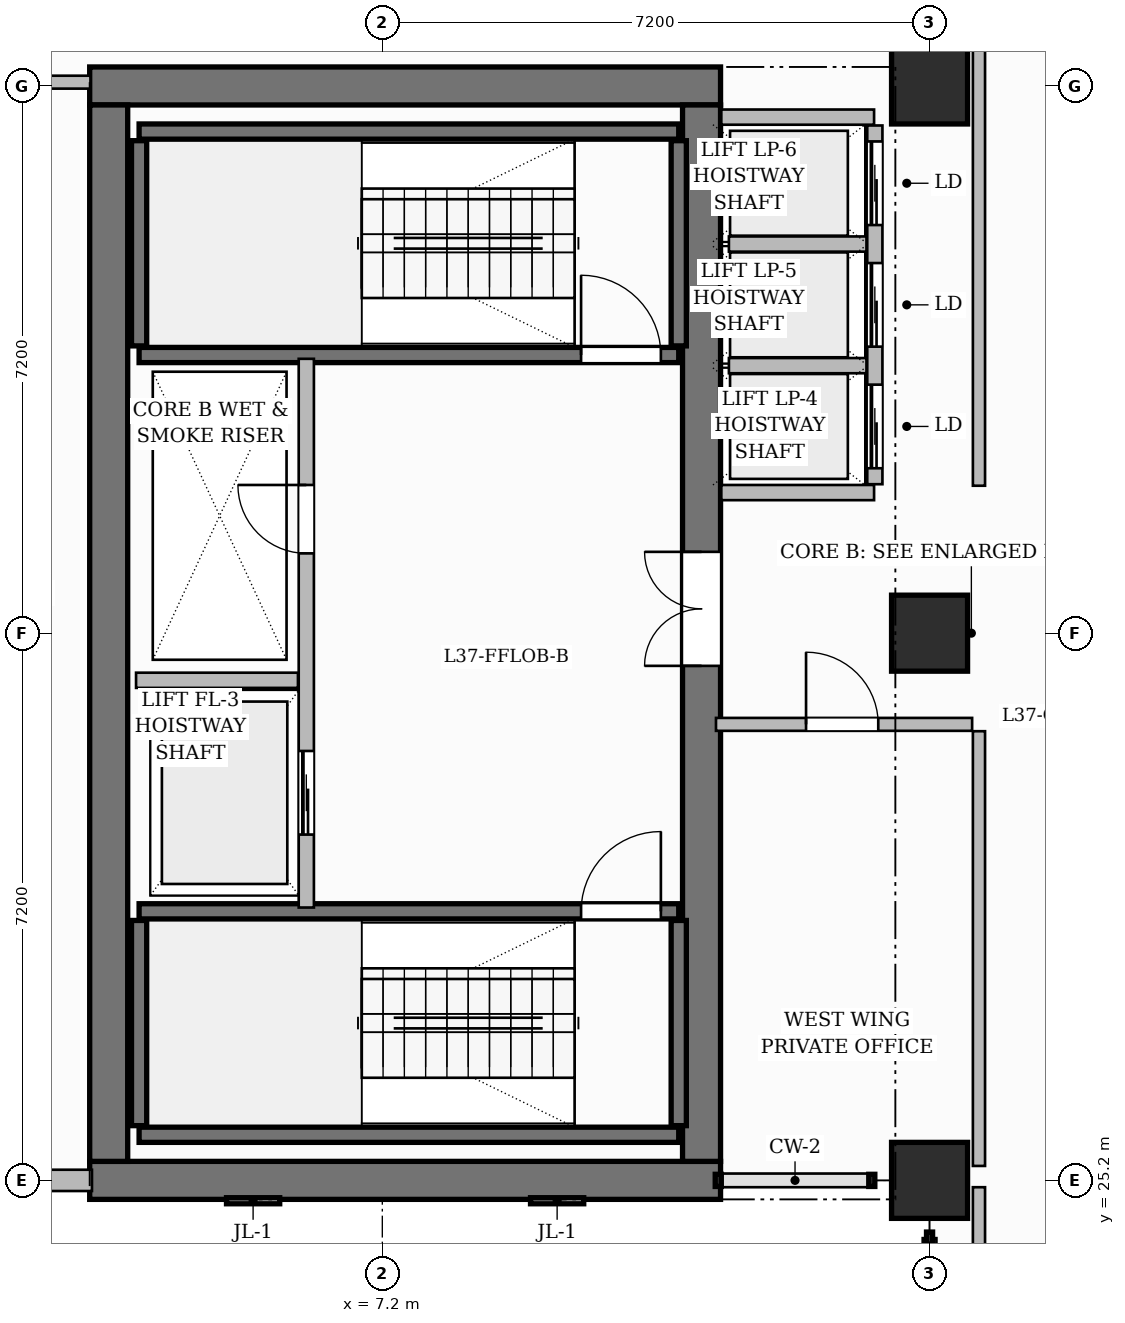
"""IFC4 building model, lengths in metres.
Left out: names, types, materials, properties, quantities, classifications, styles, units other than length and angle.
Written with IfcOpenShell. Run it as: python <this file> out.ifc"""

import sys

from ifc_helpers import new_model, si_unit, direction, frame, frame_2d, origin, origin_2d, place, context, subcontext, project, spatial, rectangle, extrude, source, transform, mapped, element, fill, save


model = new_model("IFC4")
c1 = context("Model", 3, precision=1e-05, world=origin(), true_north=direction((0.0, 1.0)))
c2 = subcontext(c1, "Body", "Model", "MODEL_VIEW")
j1 = project(units=[si_unit("LENGTHUNIT", "METRE"), si_unit("PLANEANGLEUNIT", "RADIAN")], contexts=[c1])
p1 = place(None, origin())
s1 = spatial("IfcSite", under=j1, at=p1, CompositionType="ELEMENT")
p2 = place(p1, origin())
s2 = spatial("IfcBuilding", under=s1, at=p2, CompositionType="ELEMENT")
p3 = place(p2, frame((0.0, 0.0, 150.3)))
s3 = spatial("IfcBuildingStorey", under=s2, at=p3, CompositionType="ELEMENT", Elevation=150.3)
for number, where, z_axis, x_axis in (
    (1, (3.35, 25.2, 0.0), (0.0, 0.0, 1.0), (1.0, 0.0, 0.0)),
    (2, (3.35, 39.6, 0.0), (0.0, 0.0, 1.0), (1.0, 0.0, 0.0)),
):
    element("IfcWall", number, at=place(p3, frame(where, z_axis=z_axis, x_axis=x_axis)), inside=s3, PredefinedType="SHEAR", context=c2, shape_type="SweptSolid", body=[
        extrude(rectangle(XDim=8.3, YDim=0.5, at=frame_2d((4.15, 0.0))), origin(), (0.0, 0.0, 1.0), 3.85),
    ])
p4 = place(p3, frame((3.6, 25.45, 0.0), z_axis=(0.0, 0.0, 1.0), x_axis=(0.0, 1.0, 0.0)))
e3 = element("IfcWall", 3, at=p4, inside=s3, PredefinedType="SHEAR", context=c2, shape_type="SweptSolid", body=[
    extrude(rectangle(XDim=13.9, YDim=0.5, at=frame_2d((6.95, 0.0))), origin(), (0.0, 0.0, 1.0), 3.85),
])
p5 = place(p3, frame((11.4, 25.45, 0.0), z_axis=(0.0, 0.0, 1.0), x_axis=(0.0, 1.0, 0.0)))
e4 = element("IfcWall", 4, at=p5, inside=s3, PredefinedType="SHEAR", context=c2, shape_type="SweptSolid", body=[
    extrude(rectangle(XDim=13.9, YDim=0.5, at=frame_2d((6.95, 0.0))), origin(), (0.0, 0.0, 1.0), 3.85),
])
p6 = place(p5, frame((6.52, 0.0, 0.0)))
e5 = element("IfcOpeningElement", 5, at=p6, cuts=e4, PredefinedType="OPENING", context=c2, shape_type="SweptSolid", body=[
    extrude(rectangle(XDim=1.5, YDim=2.2, at=frame_2d((0.75, 1.1))), frame((0.0, 0.26, 0.0), z_axis=(0.0, -1.0, 0.0), x_axis=(1.0, 0.0, 0.0)), (0.0, 0.0, 1.0), 0.52),
])
m1 = source(origin(), c2, "Body", "SweptSolid", [
    extrude(rectangle(XDim=1.0, YDim=1.0, at=origin_2d()), origin(), (0.0, 0.0, 1.0), 3.85),
])
for number, where, z_axis, x_axis in (
    (6, (14.4, 25.2, 0.0), (0.0, 0.0, 1.0), (1.0, 0.0, 0.0)),
    (7, (14.4, 32.4, 0.0), (0.0, 0.0, 1.0), (1.0, 0.0, 0.0)),
    (8, (14.4, 39.6, 0.0), (0.0, 0.0, 1.0), (1.0, 0.0, 0.0)),
):
    element("IfcColumn", number, at=place(p3, frame(where, z_axis=z_axis, x_axis=x_axis)), inside=s3, PredefinedType="COLUMN", context=c2, shape_type="MappedRepresentation", body=[
        mapped(m1, transform((0.0, 0.0, 0.0), scale=1.0)),
    ])
p7 = place(p3, frame((4.0, 25.8, 0.0), z_axis=(0.0, 0.0, 1.0), x_axis=(1.0, 0.0, 0.0)))
e9 = element("IfcWall", 9, at=p7, inside=s3, PredefinedType="SHEAR", context=c2, shape_type="SweptSolid", body=[
    extrude(rectangle(XDim=7.1, YDim=0.2, at=frame_2d((3.55, 0.0))), origin(), (0.0, 0.0, 1.0), 3.85),
])
for number, where, z_axis, x_axis in (
    (10, (4.0, 25.92, 0.0), (0.0, 0.0, 1.0), (0.0, 1.0, 0.0)),
    (11, (11.1, 25.92, 0.0), (0.0, 0.0, 1.0), (0.0, 1.0, 0.0)),
):
    element("IfcWall", number, at=place(p3, frame(where, z_axis=z_axis, x_axis=x_axis)), inside=s3, PredefinedType="SHEAR", context=c2, shape_type="SweptSolid", body=[
        extrude(rectangle(XDim=2.7, YDim=0.2, at=frame_2d((1.35, 0.0))), origin(), (0.0, 0.0, 1.0), 3.85),
    ])
p8 = place(p3, frame((4.0, 28.74, 0.0), z_axis=(0.0, 0.0, 1.0), x_axis=(1.0, 0.0, 0.0)))
e12 = element("IfcWall", 12, at=p8, inside=s3, PredefinedType="SHEAR", context=c2, shape_type="SweptSolid", body=[
    extrude(rectangle(XDim=7.1, YDim=0.2, at=frame_2d((3.55, 0.0))), origin(), (0.0, 0.0, 1.0), 3.85),
])
p9 = place(p8, frame((5.815, 0.0, 0.0)))
e13 = element("IfcOpeningElement", 13, at=p9, cuts=e12, PredefinedType="OPENING", context=c2, shape_type="SweptSolid", body=[
    extrude(rectangle(XDim=1.05, YDim=2.2, at=frame_2d((0.525, 1.1))), frame((0.0, 0.11, 0.0), z_axis=(0.0, -1.0, 0.0), x_axis=(1.0, 0.0, 0.0)), (0.0, 0.0, 1.0), 0.22),
])
p10 = place(p3, frame((4.0, 39.0, 0.0), z_axis=(0.0, 0.0, 1.0), x_axis=(1.0, 0.0, 0.0)))
e14 = element("IfcWall", 14, at=p10, inside=s3, PredefinedType="SHEAR", context=c2, shape_type="SweptSolid", body=[
    extrude(rectangle(XDim=7.1, YDim=0.2, at=frame_2d((3.55, 0.0))), origin(), (0.0, 0.0, 1.0), 3.85),
])
for number, where, z_axis, x_axis in (
    (15, (4.0, 36.18, 0.0), (0.0, 0.0, 1.0), (0.0, 1.0, 0.0)),
    (16, (11.1, 36.18, 0.0), (0.0, 0.0, 1.0), (0.0, 1.0, 0.0)),
):
    element("IfcWall", number, at=place(p3, frame(where, z_axis=z_axis, x_axis=x_axis)), inside=s3, PredefinedType="SHEAR", context=c2, shape_type="SweptSolid", body=[
        extrude(rectangle(XDim=2.7, YDim=0.2, at=frame_2d((1.35, 0.0))), origin(), (0.0, 0.0, 1.0), 3.85),
    ])
p11 = place(p3, frame((4.0, 36.06, 0.0), z_axis=(0.0, 0.0, 1.0), x_axis=(1.0, 0.0, 0.0)))
e17 = element("IfcWall", 17, at=p11, inside=s3, PredefinedType="SHEAR", context=c2, shape_type="SweptSolid", body=[
    extrude(rectangle(XDim=7.1, YDim=0.2, at=frame_2d((3.55, 0.0))), origin(), (0.0, 0.0, 1.0), 3.85),
])
p12 = place(p11, frame((5.815, 0.0, 0.0)))
e18 = element("IfcOpeningElement", 18, at=p12, cuts=e17, PredefinedType="OPENING", context=c2, shape_type="SweptSolid", body=[
    extrude(rectangle(XDim=1.05, YDim=2.2, at=frame_2d((0.525, 1.1))), frame((0.0, 0.11, 0.0), z_axis=(0.0, -1.0, 0.0), x_axis=(1.0, 0.0, 0.0)), (0.0, 0.0, 1.0), 0.22),
])
p13 = place(p3, frame((6.2, 28.79, 0.0), z_axis=(0.0, 0.0, 1.0), x_axis=(0.0, 1.0, 0.0)))
e19 = element("IfcWall", 19, at=p13, inside=s3, PredefinedType="PARTITIONING", context=c2, shape_type="SweptSolid", body=[
    extrude(rectangle(XDim=7.22, YDim=0.2, at=frame_2d((3.61, 0.0))), origin(), (0.0, 0.0, 1.0), 3.6),
])
p14 = place(p13, frame((4.66, 0.0, 0.0)))
e20 = element("IfcOpeningElement", 20, at=p14, cuts=e19, PredefinedType="OPENING", context=c2, shape_type="SweptSolid", body=[
    extrude(rectangle(XDim=0.9, YDim=2.1, at=frame_2d((0.45, 1.05))), frame((0.0, 0.11, 0.0), z_axis=(0.0, -1.0, 0.0), x_axis=(1.0, 0.0, 0.0)), (0.0, 0.0, 1.0), 0.22),
])
p15 = place(p13, frame((0.96, 0.0, 0.0)))
e21 = element("IfcOpeningElement", 21, at=p15, cuts=e19, PredefinedType="OPENING", context=c2, shape_type="SweptSolid", body=[
    extrude(rectangle(XDim=1.1, YDim=2.2, at=frame_2d((0.55, 1.1))), frame((0.0, 0.11, 0.0), z_axis=(0.0, -1.0, 0.0), x_axis=(1.0, 0.0, 0.0)), (0.0, 0.0, 1.0), 0.22),
])
p16 = place(p3, frame((3.96, 31.78, 0.0), z_axis=(0.0, 0.0, 1.0), x_axis=(1.0, 0.0, 0.0)))
e22 = element("IfcWall", 22, at=p16, inside=s3, PredefinedType="PARTITIONING", context=c2, shape_type="SweptSolid", body=[
    extrude(rectangle(XDim=2.13, YDim=0.2, at=frame_2d((1.065, 0.0))), origin(), (0.0, 0.0, 1.0), 3.6),
])
for number, where, z_axis, x_axis in (
    (23, (11.66, 34.25, 0.0), (0.0, 0.0, 1.0), (1.0, 0.0, 0.0)),
    (24, (11.66, 39.19, 0.0), (0.0, 0.0, 1.0), (1.0, 0.0, 0.0)),
):
    element("IfcWall", number, at=place(p3, frame(where, z_axis=z_axis, x_axis=x_axis)), inside=s3, PredefinedType="PARTITIONING", context=c2, shape_type="SweptSolid", body=[
        extrude(rectangle(XDim=2.01, YDim=0.2, at=frame_2d((1.005, 0.0))), origin(), (0.0, 0.0, 1.0), 3.6),
    ])
p17 = place(p3, frame((13.68, 34.36, 0.0), z_axis=(0.0, 0.0, 1.0), x_axis=(0.0, 1.0, 0.0)))
e25 = element("IfcWall", 25, at=p17, inside=s3, PredefinedType="PARTITIONING", context=c2, shape_type="SweptSolid", body=[
    extrude(rectangle(XDim=4.72, YDim=0.2, at=frame_2d((2.36, 0.0))), origin(), (0.0, 0.0, 1.0), 3.6),
])
p18 = place(p17, frame((0.21, 0.0, 0.0)))
e26 = element("IfcOpeningElement", 26, at=p18, cuts=e25, PredefinedType="OPENING", context=c2, shape_type="SweptSolid", body=[
    extrude(rectangle(XDim=1.1, YDim=2.2, at=frame_2d((0.55, 1.1))), frame((0.0, 0.11, 0.0), z_axis=(0.0, -1.0, 0.0), x_axis=(1.0, 0.0, 0.0)), (0.0, 0.0, 1.0), 0.22),
])
p19 = place(p17, frame((1.81, 0.0, 0.0)))
e27 = element("IfcOpeningElement", 27, at=p19, cuts=e25, PredefinedType="OPENING", context=c2, shape_type="SweptSolid", body=[
    extrude(rectangle(XDim=1.1, YDim=2.2, at=frame_2d((0.55, 1.1))), frame((0.0, 0.11, 0.0), z_axis=(0.0, -1.0, 0.0), x_axis=(1.0, 0.0, 0.0)), (0.0, 0.0, 1.0), 0.22),
])
p20 = place(p17, frame((3.41, 0.0, 0.0)))
e28 = element("IfcOpeningElement", 28, at=p20, cuts=e25, PredefinedType="OPENING", context=c2, shape_type="SweptSolid", body=[
    extrude(rectangle(XDim=1.1, YDim=2.2, at=frame_2d((0.55, 1.1))), frame((0.0, 0.11, 0.0), z_axis=(0.0, -1.0, 0.0), x_axis=(1.0, 0.0, 0.0)), (0.0, 0.0, 1.0), 0.22),
])
for number, where, z_axis, x_axis in (
    (29, (11.76, 35.92, 0.0), (0.0, 0.0, 1.0), (1.0, 0.0, 0.0)),
    (30, (11.76, 37.52, 0.0), (0.0, 0.0, 1.0), (1.0, 0.0, 0.0)),
):
    element("IfcWall", number, at=place(p3, frame(where, z_axis=z_axis, x_axis=x_axis)), inside=s3, PredefinedType="PARTITIONING", context=c2, shape_type="SweptSolid", body=[
        extrude(rectangle(XDim=1.81, YDim=0.2, at=frame_2d((0.905, 0.0))), origin(), (0.0, 0.0, 1.0), 3.6),
    ])
p21 = place(p3, frame((15.05, 11.96, 0.0), z_axis=(0.0, 0.0, 1.0), x_axis=(0.0, 1.0, 0.0)))
e31 = element("IfcWall", 31, at=p21, inside=s3, PredefinedType="PARTITIONING", context=c2, shape_type="SweptSolid", body=[
    extrude(rectangle(XDim=13.15, YDim=0.16, at=frame_2d((6.575, 0.0))), origin(), (0.0, 0.0, 1.0), 3.6),
])
p22 = place(p3, frame((0.24, 39.65, 0.0), z_axis=(0.0, 0.0, 1.0), x_axis=(1.0, 0.0, 0.0)))
e32 = element("IfcWall", 32, at=p22, inside=s3, PredefinedType="PARTITIONING", context=c2, shape_type="SweptSolid", body=[
    extrude(rectangle(XDim=3.12, YDim=0.17, at=frame_2d((1.56, 0.0))), origin(), (0.0, 0.0, 1.0), 3.6),
])
p23 = place(p22, frame((1.11, 0.0, 0.0)))
e33 = element("IfcOpeningElement", 33, at=p23, cuts=e32, PredefinedType="OPENING", context=c2, shape_type="SweptSolid", body=[
    extrude(rectangle(XDim=0.9, YDim=2.15, at=frame_2d((0.45, 1.075))), frame((0.0, 0.095, 0.0), z_axis=(0.0, -1.0, 0.0), x_axis=(1.0, 0.0, 0.0)), (0.0, 0.0, 1.0), 0.19),
])
p24 = place(p3, frame((15.05, 34.34, 0.0), z_axis=(0.0, 0.0, 1.0), x_axis=(0.0, 1.0, 0.0)))
e34 = element("IfcWall", 34, at=p24, inside=s3, PredefinedType="PARTITIONING", context=c2, shape_type="SweptSolid", body=[
    extrude(rectangle(XDim=12.312, YDim=0.16, at=frame_2d((6.156, 0.0))), origin(), (0.0, 0.0, 1.0), 3.6),
])
p25 = place(p24, frame((8.01, 0.0, 0.0)))
e35 = element("IfcOpeningElement", 35, at=p25, cuts=e34, PredefinedType="OPENING", context=c2, shape_type="SweptSolid", body=[
    extrude(rectangle(XDim=1.6, YDim=2.4, at=frame_2d((0.8, 1.2))), frame((0.0, 0.09, 0.0), z_axis=(0.0, -1.0, 0.0), x_axis=(1.0, 0.0, 0.0)), (0.0, 0.0, 1.0), 0.18),
])
p26 = place(p3, frame((15.05, 25.39, 0.0), z_axis=(0.0, 0.0, 1.0), x_axis=(0.0, 1.0, 0.0)))
e36 = element("IfcWall", 36, at=p26, inside=s3, PredefinedType="PARTITIONING", context=c2, shape_type="SweptSolid", body=[
    extrude(rectangle(XDim=5.72, YDim=0.16, at=frame_2d((2.86, 0.0))), origin(), (0.0, 0.0, 1.0), 3.6),
])
p27 = place(p3, frame((11.59, 31.2, 0.0), z_axis=(0.0, 0.0, 1.0), x_axis=(1.0, 0.0, 0.0)))
e37 = element("IfcWall", 37, at=p27, inside=s3, PredefinedType="PARTITIONING", context=c2, shape_type="SweptSolid", body=[
    extrude(rectangle(XDim=3.37, YDim=0.17, at=frame_2d((1.685, 0.0))), origin(), (0.0, 0.0, 1.0), 3.6),
])
p28 = place(p27, frame((1.185, 0.0, 0.0)))
e38 = element("IfcOpeningElement", 38, at=p28, cuts=e37, PredefinedType="OPENING", context=c2, shape_type="SweptSolid", body=[
    extrude(rectangle(XDim=0.95, YDim=2.15, at=frame_2d((0.475, 1.075))), frame((0.0, 0.095, 0.0), z_axis=(0.0, -1.0, 0.0), x_axis=(1.0, 0.0, 0.0)), (0.0, 0.0, 1.0), 0.19),
])
p29 = place(p3, frame((0.0, 25.2, 0.0), z_axis=(0.0, 0.0, 1.0), x_axis=(1.0, 0.0, 0.0)))
e39 = element("IfcWall", 39, at=p29, inside=s3, PredefinedType="SOLIDWALL", context=c2, shape_type="SweptSolid", body=[
    extrude(rectangle(XDim=3.38, YDim=0.28, at=frame_2d((1.69, 0.0))), origin(), (0.0, 0.0, 1.0), 3.6),
])
p30 = place(p29, frame((1.205, 0.0, 0.8)))
e40 = element("IfcOpeningElement", 40, at=p30, cuts=e39, PredefinedType="OPENING", context=c2, shape_type="SweptSolid", body=[
    extrude(rectangle(XDim=1.4, YDim=1.85, at=frame_2d((0.7, 0.925))), frame((0.0, 0.15, 0.0), z_axis=(0.0, -1.0, 0.0), x_axis=(1.0, 0.0, 0.0)), (0.0, 0.0, 1.0), 0.3),
])
m2 = source(origin(), c2, "Body", "SweptSolid", [
    extrude(rectangle(XDim=1.05, YDim=2.2, at=frame_2d((0.525, 1.1))), frame((0.0, 0.025, 0.0), z_axis=(0.0, -1.0, 0.0), x_axis=(1.0, 0.0, 0.0)), (0.0, 0.0, 1.0), 0.05),
])
p31 = place(p9, origin())
e41 = element("IfcDoor", 41, at=p31, inside=s3, OperationType="SINGLE_SWING_RIGHT", PredefinedType="DOOR", context=c2, shape_type="MappedRepresentation", body=[
    mapped(m2, transform((0.0, 0.0, 0.0), scale=1.0)),
])
fill(e13, e41)
p32 = place(p12, origin())
e42 = element("IfcDoor", 42, at=p32, inside=s3, OperationType="SINGLE_SWING_LEFT", PredefinedType="DOOR", context=c2, shape_type="MappedRepresentation", body=[
    mapped(m2, transform((0.0, 0.0, 0.0), scale=1.0)),
])
fill(e18, e42)
m3 = source(origin(), c2, "Body", "SweptSolid", [
    extrude(rectangle(XDim=0.9, YDim=2.1, at=frame_2d((0.45, 1.05))), frame((0.0, 0.025, 0.0), z_axis=(0.0, -1.0, 0.0), x_axis=(1.0, 0.0, 0.0)), (0.0, 0.0, 1.0), 0.05),
])
p33 = place(p14, origin())
e43 = element("IfcDoor", 43, at=p33, inside=s3, OperationType="SINGLE_SWING_RIGHT", PredefinedType="DOOR", context=c2, shape_type="MappedRepresentation", body=[
    mapped(m3, transform((0.0, 0.0, 0.0), scale=1.0)),
])
fill(e20, e43)
m4 = source(origin(), c2, "Body", "SweptSolid", [
    extrude(rectangle(XDim=1.5, YDim=2.2, at=frame_2d((0.75, 1.1))), frame((0.0, 0.025, 0.0), z_axis=(0.0, -1.0, 0.0), x_axis=(1.0, 0.0, 0.0)), (0.0, 0.0, 1.0), 0.05),
])
p34 = place(p6, origin())
e44 = element("IfcDoor", 44, at=p34, inside=s3, OperationType="DOUBLE_DOOR_SINGLE_SWING", PredefinedType="DOOR", context=c2, shape_type="MappedRepresentation", body=[
    mapped(m4, transform((0.0, 0.0, 0.0), scale=1.0)),
])
fill(e5, e44)
m5 = source(origin(), c2, "Body", "SweptSolid", [
    extrude(rectangle(XDim=0.95, YDim=2.15, at=frame_2d((0.475, 1.075))), frame((0.0, 0.025, 0.0), z_axis=(0.0, -1.0, 0.0), x_axis=(1.0, 0.0, 0.0)), (0.0, 0.0, 1.0), 0.05),
])
p35 = place(p28, origin())
e45 = element("IfcDoor", 45, at=p35, inside=s3, OperationType="SINGLE_SWING_LEFT", PredefinedType="DOOR", context=c2, shape_type="MappedRepresentation", body=[
    mapped(m5, transform((0.0, 0.0, 0.0), scale=1.0)),
])
fill(e38, e45)
m6 = source(origin(), c2, "Body", "SweptSolid", [
    extrude(rectangle(XDim=1.1, YDim=2.2, at=frame_2d((0.55, 1.1))), frame((0.0, 0.025, 0.0), z_axis=(0.0, -1.0, 0.0), x_axis=(1.0, 0.0, 0.0)), (0.0, 0.0, 1.0), 0.05),
])
p36 = place(p15, origin())
e46 = element("IfcDoor", 46, at=p36, inside=s3, OperationType="SLIDING_TO_LEFT", PredefinedType="DOOR", context=c2, shape_type="MappedRepresentation", body=[
    mapped(m6, transform((0.0, 0.0, 0.0), scale=1.0)),
])
fill(e21, e46)
p37 = place(p18, origin())
e47 = element("IfcDoor", 47, at=p37, inside=s3, OperationType="SLIDING_TO_LEFT", PredefinedType="DOOR", context=c2, shape_type="MappedRepresentation", body=[
    mapped(m6, transform((0.0, 0.0, 0.0), scale=1.0)),
])
fill(e26, e47)
p38 = place(p19, origin())
e48 = element("IfcDoor", 48, at=p38, inside=s3, OperationType="SLIDING_TO_LEFT", PredefinedType="DOOR", context=c2, shape_type="MappedRepresentation", body=[
    mapped(m6, transform((0.0, 0.0, 0.0), scale=1.0)),
])
fill(e27, e48)
p39 = place(p20, origin())
e49 = element("IfcDoor", 49, at=p39, inside=s3, OperationType="SLIDING_TO_LEFT", PredefinedType="DOOR", context=c2, shape_type="MappedRepresentation", body=[
    mapped(m6, transform((0.0, 0.0, 0.0), scale=1.0)),
])
fill(e28, e49)
save(model, sys.argv[1])
